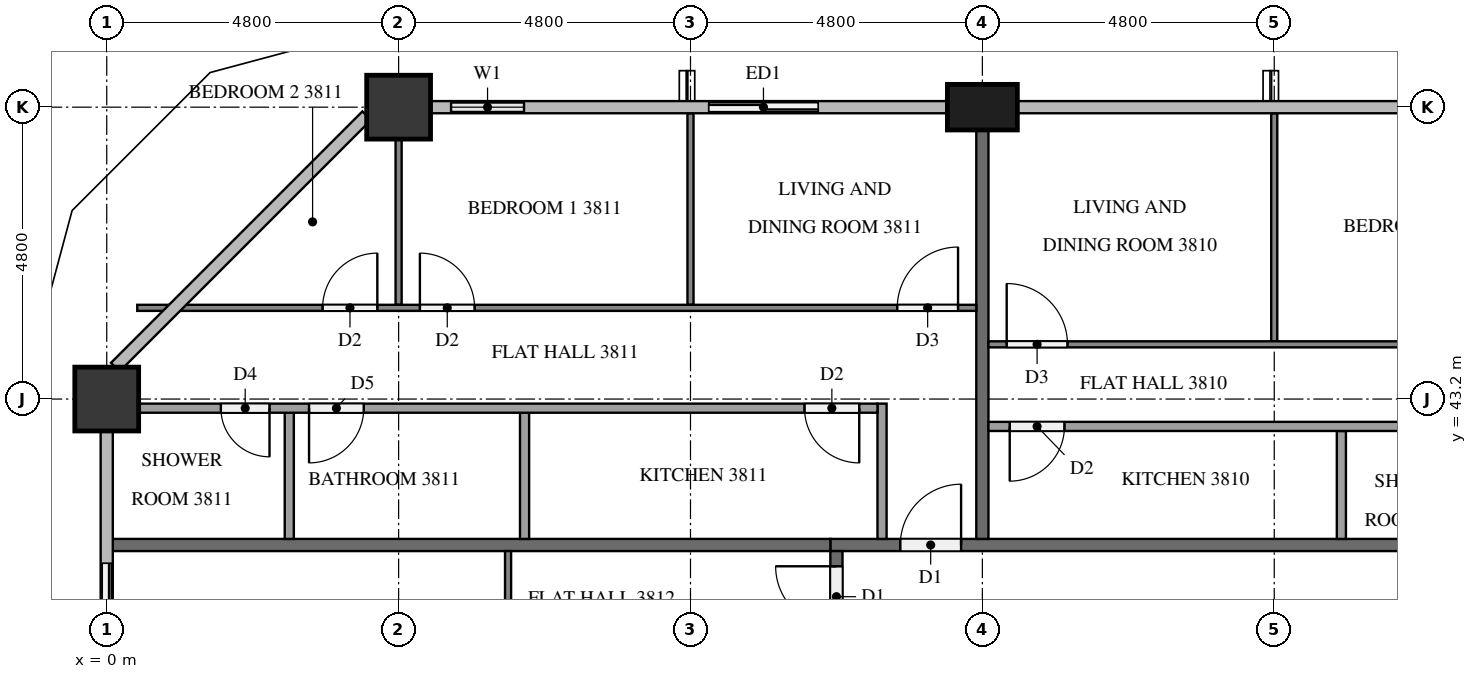
"""IFC4 building model, lengths in metres.
Left out: names, types, materials, properties, quantities, classifications, styles, units other than length and angle.
Written with IfcOpenShell. Run it as: python <this file> out.ifc"""

import sys

from ifc_helpers import new_model, si_unit, direction, frame, frame_2d, origin, origin_2d, place, context, subcontext, project, spatial, rectangle, extrude, element, fill, save


model = new_model("IFC4")
c1 = context("Model", 3, precision=1e-05, world=origin(), true_north=direction((0.0, 1.0)))
c2 = subcontext(c1, "Body", "Model", "MODEL_VIEW")
j1 = project(units=[si_unit("LENGTHUNIT", "METRE"), si_unit("PLANEANGLEUNIT", "RADIAN")], contexts=[c1])
p1 = place(None, origin())
s1 = spatial("IfcSite", under=j1, at=p1, CompositionType="ELEMENT")
p2 = place(p1, origin())
s2 = spatial("IfcBuilding", under=s1, at=p2, CompositionType="ELEMENT")
p3 = place(p2, frame((0.0, 0.0, 149.0)))
s3 = spatial("IfcBuildingStorey", under=s2, at=p3, CompositionType="ELEMENT", Elevation=149.0)
p4 = place(p3, frame((14.4, 48.0, 0.0), z_axis=(0.0, 0.0, 1.0), x_axis=(1.0, 0.0, 0.0)))
e1 = element("IfcColumn", 1, at=p4, inside=s3, PredefinedType="COLUMN", context=c2, shape_type="SweptSolid", body=[
    extrude(rectangle(XDim=1.15, YDim=0.75, at=origin_2d()), origin(), (0.0, 0.0, 1.0), 3.2),
])
for number, where, z_axis, x_axis in (
    (2, (4.8, 48.0, 0.0), (0.0, 0.0, 1.0), (1.0, 0.0, 0.0)),
    (3, (0.0, 43.2, 0.0), (0.0, 0.0, 1.0), (1.0, 0.0, 0.0)),
):
    element("IfcColumn", number, at=place(p3, frame(where, z_axis=z_axis, x_axis=x_axis)), inside=s3, PredefinedType="COLUMN", context=c2, shape_type="SweptSolid", body=[
        extrude(rectangle(XDim=1.05, YDim=1.05, at=origin_2d()), origin(), (0.0, 0.0, 1.0), 3.2),
    ])
p5 = place(p3, frame((12.0, 48.0, 0.0), z_axis=(0.0, 0.0, 1.0), x_axis=(-1.0, 0.0, 0.0)))
e4 = element("IfcWall", 4, at=p5, inside=s3, PredefinedType="SOLIDWALL", context=c2, shape_type="SweptSolid", body=[
    extrude(rectangle(XDim=2.4, YDim=0.15, at=frame_2d((1.2, 0.0))), origin(), (0.0, 0.0, 1.0), 3.2),
])
p6 = place(p5, frame((0.3, 0.0, 0.0)))
e5 = element("IfcOpeningElement", 5, at=p6, cuts=e4, PredefinedType="OPENING", context=c2, shape_type="SweptSolid", body=[
    extrude(rectangle(XDim=1.8, YDim=2.4, at=frame_2d((0.9, 1.2))), frame((0.0, 0.085, 0.0), z_axis=(0.0, -1.0, 0.0), x_axis=(1.0, 0.0, 0.0)), (0.0, 0.0, 1.0), 0.17),
])
p7 = place(p3, frame((7.2, 48.0, 0.0), z_axis=(0.0, 0.0, 1.0), x_axis=(-1.0, 0.0, 0.0)))
e6 = element("IfcWall", 6, at=p7, inside=s3, PredefinedType="SOLIDWALL", context=c2, shape_type="SweptSolid", body=[
    extrude(rectangle(XDim=1.875, YDim=0.15, at=frame_2d((0.938, 0.0))), origin(), (0.0, 0.0, 1.0), 3.2),
])
p8 = place(p7, frame((0.337, 0.0, 0.9)))
e7 = element("IfcOpeningElement", 7, at=p8, cuts=e6, PredefinedType="OPENING", context=c2, shape_type="SweptSolid", body=[
    extrude(rectangle(XDim=1.2, YDim=1.4, at=frame_2d((0.6, 0.7))), frame((0.0, 0.085, 0.0), z_axis=(0.0, -1.0, 0.0), x_axis=(1.0, 0.0, 0.0)), (0.0, 0.0, 1.0), 0.17),
])
p9 = place(p3, frame((0.0, 40.8, 0.0), z_axis=(0.0, 0.0, 1.0), x_axis=(0.0, -1.0, 0.0)))
e8 = element("IfcWall", 8, at=p9, inside=s3, PredefinedType="SOLIDWALL", context=c2, shape_type="SweptSolid", body=[
    extrude(rectangle(XDim=2.4, YDim=0.15, at=frame_2d((1.2, 0.0))), origin(), (0.0, 0.0, 1.0), 3.2),
])
p10 = place(p9, frame((0.3, 0.0, 0.0)))
e9 = element("IfcOpeningElement", 9, at=p10, cuts=e8, PredefinedType="OPENING", context=c2, shape_type="SweptSolid", body=[
    extrude(rectangle(XDim=1.8, YDim=2.4, at=frame_2d((0.9, 1.2))), frame((0.0, 0.085, 0.0), z_axis=(0.0, -1.0, 0.0), x_axis=(1.0, 0.0, 0.0)), (0.0, 0.0, 1.0), 0.17),
])
p11 = place(p3, frame((11.9, 40.8, 0.0), z_axis=(0.0, 0.0, 1.0), x_axis=(1.0, 0.0, 0.0)))
e10 = element("IfcWall", 10, at=p11, inside=s3, PredefinedType="PARTITIONING", context=c2, shape_type="SweptSolid", body=[
    extrude(rectangle(XDim=38.6, YDim=0.2, at=frame_2d((19.3, 0.0))), origin(), (0.0, 0.0, 1.0), 3.2),
])
p12 = place(p11, frame((31.65, 0.0, 0.0)))
e11 = element("IfcOpeningElement", 11, at=p12, cuts=e10, PredefinedType="OPENING", context=c2, shape_type="SweptSolid", body=[
    extrude(rectangle(XDim=1.0, YDim=2.1, at=frame_2d((0.5, 1.05))), frame((0.0, 0.11, 0.0), z_axis=(0.0, -1.0, 0.0), x_axis=(1.0, 0.0, 0.0)), (0.0, 0.0, 1.0), 0.22),
])
p13 = place(p11, frame((29.95, 0.0, 0.0)))
e12 = element("IfcOpeningElement", 12, at=p13, cuts=e10, PredefinedType="OPENING", context=c2, shape_type="SweptSolid", body=[
    extrude(rectangle(XDim=1.0, YDim=2.1, at=frame_2d((0.5, 1.05))), frame((0.0, 0.11, 0.0), z_axis=(0.0, -1.0, 0.0), x_axis=(1.0, 0.0, 0.0)), (0.0, 0.0, 1.0), 0.22),
])
p14 = place(p11, frame((15.55, 0.0, 0.0)))
e13 = element("IfcOpeningElement", 13, at=p14, cuts=e10, PredefinedType="OPENING", context=c2, shape_type="SweptSolid", body=[
    extrude(rectangle(XDim=1.0, YDim=2.1, at=frame_2d((0.5, 1.05))), frame((0.0, 0.11, 0.0), z_axis=(0.0, -1.0, 0.0), x_axis=(1.0, 0.0, 0.0)), (0.0, 0.0, 1.0), 0.22),
])
p15 = place(p11, frame((1.15, 0.0, 0.0)))
e14 = element("IfcOpeningElement", 14, at=p15, cuts=e10, PredefinedType="OPENING", context=c2, shape_type="SweptSolid", body=[
    extrude(rectangle(XDim=1.0, YDim=2.1, at=frame_2d((0.5, 1.05))), frame((0.0, 0.11, 0.0), z_axis=(0.0, -1.0, 0.0), x_axis=(1.0, 0.0, 0.0)), (0.0, 0.0, 1.0), 0.22),
])
p16 = place(p3, frame((12.0, 12.1, 0.0), z_axis=(0.0, 0.0, 1.0), x_axis=(0.0, 1.0, 0.0)))
e15 = element("IfcWall", 15, at=p16, inside=s3, PredefinedType="PARTITIONING", context=c2, shape_type="SweptSolid", body=[
    extrude(rectangle(XDim=28.6, YDim=0.2, at=frame_2d((14.3, 0.0))), origin(), (0.0, 0.0, 1.0), 3.2),
])
p17 = place(p16, frame((27.35, 0.0, 0.0)))
e16 = element("IfcOpeningElement", 16, at=p17, cuts=e15, PredefinedType="OPENING", context=c2, shape_type="SweptSolid", body=[
    extrude(rectangle(XDim=1.0, YDim=2.1, at=frame_2d((0.5, 1.05))), frame((0.0, 0.11, 0.0), z_axis=(0.0, -1.0, 0.0), x_axis=(1.0, 0.0, 0.0)), (0.0, 0.0, 1.0), 0.22),
])
p18 = place(p16, frame((20.15, 0.0, 0.0)))
e17 = element("IfcOpeningElement", 17, at=p18, cuts=e15, PredefinedType="OPENING", context=c2, shape_type="SweptSolid", body=[
    extrude(rectangle(XDim=1.0, YDim=2.1, at=frame_2d((0.5, 1.05))), frame((0.0, 0.11, 0.0), z_axis=(0.0, -1.0, 0.0), x_axis=(1.0, 0.0, 0.0)), (0.0, 0.0, 1.0), 0.22),
])
p19 = place(p16, frame((10.55, 0.0, 0.0)))
e18 = element("IfcOpeningElement", 18, at=p19, cuts=e15, PredefinedType="OPENING", context=c2, shape_type="SweptSolid", body=[
    extrude(rectangle(XDim=1.0, YDim=2.1, at=frame_2d((0.5, 1.05))), frame((0.0, 0.11, 0.0), z_axis=(0.0, -1.0, 0.0), x_axis=(1.0, 0.0, 0.0)), (0.0, 0.0, 1.0), 0.22),
])
p20 = place(p3, frame((14.4, 47.625, 0.0), z_axis=(0.0, 0.0, 1.0), x_axis=(0.0, -1.0, 0.0)))
e19 = element("IfcWall", 19, at=p20, inside=s3, PredefinedType="PARTITIONING", context=c2, shape_type="SweptSolid", body=[
    extrude(rectangle(XDim=6.725, YDim=0.2, at=frame_2d((3.363, 0.0))), origin(), (0.0, 0.0, 1.0), 3.2),
])
p21 = place(p3, frame((0.1, 40.8, 0.0), z_axis=(0.0, 0.0, 1.0), x_axis=(1.0, 0.0, 0.0)))
e20 = element("IfcWall", 20, at=p21, inside=s3, PredefinedType="PARTITIONING", context=c2, shape_type="SweptSolid", body=[
    extrude(rectangle(XDim=11.8, YDim=0.2, at=frame_2d((5.9, 0.0))), origin(), (0.0, 0.0, 1.0), 3.2),
])
p22 = place(p3, frame((19.2, 44.15, 0.0), z_axis=(0.0, 0.0, 1.0), x_axis=(0.0, 1.0, 0.0)))
e21 = element("IfcWall", 21, at=p22, inside=s3, PredefinedType="PARTITIONING", context=c2, shape_type="SweptSolid", body=[
    extrude(rectangle(XDim=3.75, YDim=0.1, at=frame_2d((1.875, 0.0))), origin(), (0.0, 0.0, 1.0), 3.2),
])
p23 = place(p3, frame((14.5, 44.1, 0.0), z_axis=(0.0, 0.0, 1.0), x_axis=(1.0, 0.0, 0.0)))
e22 = element("IfcWall", 22, at=p23, inside=s3, PredefinedType="PARTITIONING", context=c2, shape_type="SweptSolid", body=[
    extrude(rectangle(XDim=14.2, YDim=0.1, at=frame_2d((7.1, 0.0))), origin(), (0.0, 0.0, 1.0), 3.2),
])
p24 = place(p23, frame((9.85, 0.0, 0.0)))
e23 = element("IfcOpeningElement", 23, at=p24, cuts=e22, PredefinedType="OPENING", context=c2, shape_type="SweptSolid", body=[
    extrude(rectangle(XDim=0.9, YDim=2.1, at=frame_2d((0.45, 1.05))), frame((0.0, 0.06, 0.0), z_axis=(0.0, -1.0, 0.0), x_axis=(1.0, 0.0, 0.0)), (0.0, 0.0, 1.0), 0.12),
])
p25 = place(p23, frame((8.25, 0.0, 0.0)))
e24 = element("IfcOpeningElement", 24, at=p25, cuts=e22, PredefinedType="OPENING", context=c2, shape_type="SweptSolid", body=[
    extrude(rectangle(XDim=0.9, YDim=2.1, at=frame_2d((0.45, 1.05))), frame((0.0, 0.06, 0.0), z_axis=(0.0, -1.0, 0.0), x_axis=(1.0, 0.0, 0.0)), (0.0, 0.0, 1.0), 0.12),
])
p26 = place(p23, frame((0.3, 0.0, 0.0)))
e25 = element("IfcOpeningElement", 25, at=p26, cuts=e22, PredefinedType="OPENING", context=c2, shape_type="SweptSolid", body=[
    extrude(rectangle(XDim=1.0, YDim=2.1, at=frame_2d((0.5, 1.05))), frame((0.0, 0.06, 0.0), z_axis=(0.0, -1.0, 0.0), x_axis=(1.0, 0.0, 0.0)), (0.0, 0.0, 1.0), 0.12),
])
p27 = place(p3, frame((20.304, 40.9, 0.0), z_axis=(0.0, 0.0, 1.0), x_axis=(0.0, 1.0, 0.0)))
e26 = element("IfcWall", 26, at=p27, inside=s3, PredefinedType="PARTITIONING", context=c2, shape_type="SweptSolid", body=[
    extrude(rectangle(XDim=1.775, YDim=0.15, at=frame_2d((0.888, 0.0))), origin(), (0.0, 0.0, 1.0), 3.2),
])
p28 = place(p3, frame((27.075, 42.75, 0.0), z_axis=(0.0, 0.0, 1.0), x_axis=(-1.0, 0.0, 0.0)))
e27 = element("IfcWall", 27, at=p28, inside=s3, PredefinedType="PARTITIONING", context=c2, shape_type="SweptSolid", body=[
    extrude(rectangle(XDim=12.575, YDim=0.15, at=frame_2d((6.288, 0.0))), origin(), (0.0, 0.0, 1.0), 3.2),
])
p29 = place(p28, frame((2.644, 0.0, 0.0)))
e28 = element("IfcOpeningElement", 28, at=p29, cuts=e27, PredefinedType="OPENING", context=c2, shape_type="SweptSolid", body=[
    extrude(rectangle(XDim=0.9, YDim=2.1, at=frame_2d((0.45, 1.05))), frame((0.0, 0.085, 0.0), z_axis=(0.0, -1.0, 0.0), x_axis=(1.0, 0.0, 0.0)), (0.0, 0.0, 1.0), 0.17),
])
p30 = place(p28, frame((4.194, 0.0, 0.0)))
e29 = element("IfcOpeningElement", 29, at=p30, cuts=e27, PredefinedType="OPENING", context=c2, shape_type="SweptSolid", body=[
    extrude(rectangle(XDim=0.8, YDim=2.1, at=frame_2d((0.4, 1.05))), frame((0.0, 0.085, 0.0), z_axis=(0.0, -1.0, 0.0), x_axis=(1.0, 0.0, 0.0)), (0.0, 0.0, 1.0), 0.17),
])
p31 = place(p28, frame((11.325, 0.0, 0.0)))
e30 = element("IfcOpeningElement", 30, at=p31, cuts=e27, PredefinedType="OPENING", context=c2, shape_type="SweptSolid", body=[
    extrude(rectangle(XDim=0.9, YDim=2.1, at=frame_2d((0.45, 1.05))), frame((0.0, 0.085, 0.0), z_axis=(0.0, -1.0, 0.0), x_axis=(1.0, 0.0, 0.0)), (0.0, 0.0, 1.0), 0.17),
])
p32 = place(p3, frame((9.6, 44.75, 0.0), z_axis=(0.0, 0.0, 1.0), x_axis=(0.0, 1.0, 0.0)))
e31 = element("IfcWall", 31, at=p32, inside=s3, PredefinedType="PARTITIONING", context=c2, shape_type="SweptSolid", body=[
    extrude(rectangle(XDim=3.15, YDim=0.1, at=frame_2d((1.575, 0.0))), origin(), (0.0, 0.0, 1.0), 3.2),
])
p33 = place(p3, frame((4.8, 44.75, 0.0), z_axis=(0.0, 0.0, 1.0), x_axis=(0.0, 1.0, 0.0)))
e32 = element("IfcWall", 32, at=p33, inside=s3, PredefinedType="PARTITIONING", context=c2, shape_type="SweptSolid", body=[
    extrude(rectangle(XDim=2.725, YDim=0.1, at=frame_2d((1.363, 0.0))), origin(), (0.0, 0.0, 1.0), 3.2),
])
p34 = place(p3, frame((0.502, 44.7, 0.0), z_axis=(0.0, 0.0, 1.0), x_axis=(1.0, 0.0, 0.0)))
e33 = element("IfcWall", 33, at=p34, inside=s3, PredefinedType="PARTITIONING", context=c2, shape_type="SweptSolid", body=[
    extrude(rectangle(XDim=13.798, YDim=0.1, at=frame_2d((6.899, 0.0))), origin(), (0.0, 0.0, 1.0), 3.2),
])
p35 = place(p34, frame((12.498, 0.0, 0.0)))
e34 = element("IfcOpeningElement", 34, at=p35, cuts=e33, PredefinedType="OPENING", context=c2, shape_type="SweptSolid", body=[
    extrude(rectangle(XDim=1.0, YDim=2.1, at=frame_2d((0.5, 1.05))), frame((0.0, 0.06, 0.0), z_axis=(0.0, -1.0, 0.0), x_axis=(1.0, 0.0, 0.0)), (0.0, 0.0, 1.0), 0.12),
])
p36 = place(p34, frame((4.648, 0.0, 0.0)))
e35 = element("IfcOpeningElement", 35, at=p36, cuts=e33, PredefinedType="OPENING", context=c2, shape_type="SweptSolid", body=[
    extrude(rectangle(XDim=0.9, YDim=2.1, at=frame_2d((0.45, 1.05))), frame((0.0, 0.06, 0.0), z_axis=(0.0, -1.0, 0.0), x_axis=(1.0, 0.0, 0.0)), (0.0, 0.0, 1.0), 0.12),
])
p37 = place(p34, frame((3.048, 0.0, 0.0)))
e36 = element("IfcOpeningElement", 36, at=p37, cuts=e33, PredefinedType="OPENING", context=c2, shape_type="SweptSolid", body=[
    extrude(rectangle(XDim=0.9, YDim=2.1, at=frame_2d((0.45, 1.05))), frame((0.0, 0.06, 0.0), z_axis=(0.0, -1.0, 0.0), x_axis=(1.0, 0.0, 0.0)), (0.0, 0.0, 1.0), 0.12),
])
for number, where, z_axis, x_axis in (
    (37, (6.871, 40.9, 0.0), (0.0, 0.0, 1.0), (0.0, 1.0, 0.0)),
    (38, (3.002, 40.9, 0.0), (0.0, 0.0, 1.0), (0.0, 1.0, 0.0)),
):
    element("IfcWall", number, at=place(p3, frame(where, z_axis=z_axis, x_axis=x_axis)), inside=s3, PredefinedType="PARTITIONING", context=c2, shape_type="SweptSolid", body=[
        extrude(rectangle(XDim=2.075, YDim=0.15, at=frame_2d((1.038, 0.0))), origin(), (0.0, 0.0, 1.0), 3.2),
    ])
p38 = place(p3, frame((12.75, 40.9, 0.0), z_axis=(0.0, 0.0, 1.0), x_axis=(0.0, 1.0, 0.0)))
e39 = element("IfcWall", 39, at=p38, inside=s3, PredefinedType="PARTITIONING", context=c2, shape_type="SweptSolid", body=[
    extrude(rectangle(XDim=2.225, YDim=0.15, at=frame_2d((1.113, 0.0))), origin(), (0.0, 0.0, 1.0), 3.2),
])
p39 = place(p3, frame((12.675, 43.05, 0.0), z_axis=(0.0, 0.0, 1.0), x_axis=(-1.0, 0.0, 0.0)))
e40 = element("IfcWall", 40, at=p39, inside=s3, PredefinedType="PARTITIONING", context=c2, shape_type="SweptSolid", body=[
    extrude(rectangle(XDim=12.15, YDim=0.15, at=frame_2d((6.075, 0.0))), origin(), (0.0, 0.0, 1.0), 3.2),
])
p40 = place(p39, frame((0.3, 0.0, 0.0)))
e41 = element("IfcOpeningElement", 41, at=p40, cuts=e40, PredefinedType="OPENING", context=c2, shape_type="SweptSolid", body=[
    extrude(rectangle(XDim=0.9, YDim=2.1, at=frame_2d((0.45, 1.05))), frame((0.0, 0.085, 0.0), z_axis=(0.0, -1.0, 0.0), x_axis=(1.0, 0.0, 0.0)), (0.0, 0.0, 1.0), 0.17),
])
p41 = place(p39, frame((8.448, 0.0, 0.0)))
e42 = element("IfcOpeningElement", 42, at=p41, cuts=e40, PredefinedType="OPENING", context=c2, shape_type="SweptSolid", body=[
    extrude(rectangle(XDim=0.9, YDim=2.1, at=frame_2d((0.45, 1.05))), frame((0.0, 0.085, 0.0), z_axis=(0.0, -1.0, 0.0), x_axis=(1.0, 0.0, 0.0)), (0.0, 0.0, 1.0), 0.17),
])
p42 = place(p39, frame((9.998, 0.0, 0.0)))
e43 = element("IfcOpeningElement", 43, at=p42, cuts=e40, PredefinedType="OPENING", context=c2, shape_type="SweptSolid", body=[
    extrude(rectangle(XDim=0.8, YDim=2.1, at=frame_2d((0.4, 1.05))), frame((0.0, 0.085, 0.0), z_axis=(0.0, -1.0, 0.0), x_axis=(1.0, 0.0, 0.0)), (0.0, 0.0, 1.0), 0.17),
])
p43 = place(p3, frame((6.6, 33.7, 0.0), z_axis=(0.0, 0.0, 1.0), x_axis=(0.0, 1.0, 0.0)))
e44 = element("IfcWall", 44, at=p43, inside=s3, PredefinedType="PARTITIONING", context=c2, shape_type="SweptSolid", body=[
    extrude(rectangle(XDim=7.0, YDim=0.1, at=frame_2d((3.5, 0.0))), origin(), (0.0, 0.0, 1.0), 3.2),
])
p44 = place(p43, frame((0.3, 0.0, 0.0)))
e45 = element("IfcOpeningElement", 45, at=p44, cuts=e44, PredefinedType="OPENING", context=c2, shape_type="SweptSolid", body=[
    extrude(rectangle(XDim=1.0, YDim=2.1, at=frame_2d((0.5, 1.05))), frame((0.0, 0.06, 0.0), z_axis=(0.0, -1.0, 0.0), x_axis=(1.0, 0.0, 0.0)), (0.0, 0.0, 1.0), 0.12),
])
p45 = place(p6, origin())
e46 = element("IfcDoor", 46, at=p45, inside=s3, OperationType="SLIDING_TO_RIGHT", PredefinedType="DOOR", context=c2, shape_type="SweptSolid", body=[
    extrude(rectangle(XDim=1.8, YDim=2.4, at=frame_2d((0.9, 1.2))), frame((0.0, 0.025, 0.0), z_axis=(0.0, -1.0, 0.0), x_axis=(1.0, 0.0, 0.0)), (0.0, 0.0, 1.0), 0.05),
])
fill(e5, e46)
p46 = place(p8, origin())
e47 = element("IfcWindow", 47, at=p46, inside=s3, PartitioningType="SINGLE_PANEL", PredefinedType="WINDOW", context=c2, shape_type="SweptSolid", body=[
    extrude(rectangle(XDim=1.2, YDim=1.4, at=frame_2d((0.6, 0.7))), frame((0.0, 0.03, 0.0), z_axis=(0.0, -1.0, 0.0), x_axis=(1.0, 0.0, 0.0)), (0.0, 0.0, 1.0), 0.06),
])
fill(e7, e47)
p47 = place(p10, origin())
e48 = element("IfcDoor", 48, at=p47, inside=s3, OperationType="SLIDING_TO_LEFT", PredefinedType="DOOR", context=c2, shape_type="SweptSolid", body=[
    extrude(rectangle(XDim=1.8, YDim=2.4, at=frame_2d((0.9, 1.2))), frame((0.0, 0.025, 0.0), z_axis=(0.0, -1.0, 0.0), x_axis=(1.0, 0.0, 0.0)), (0.0, 0.0, 1.0), 0.05),
])
fill(e9, e48)
p48 = place(p15, origin())
e49 = element("IfcDoor", 49, at=p48, inside=s3, OperationType="SINGLE_SWING_RIGHT", PredefinedType="DOOR", context=c2, shape_type="SweptSolid", body=[
    extrude(rectangle(XDim=1.0, YDim=2.1, at=frame_2d((0.5, 1.05))), frame((0.0, 0.025, 0.0), z_axis=(0.0, -1.0, 0.0), x_axis=(1.0, 0.0, 0.0)), (0.0, 0.0, 1.0), 0.05),
])
fill(e14, e49)
p49 = place(p17, origin())
e50 = element("IfcDoor", 50, at=p49, inside=s3, OperationType="SINGLE_SWING_RIGHT", PredefinedType="DOOR", context=c2, shape_type="SweptSolid", body=[
    extrude(rectangle(XDim=1.0, YDim=2.1, at=frame_2d((0.5, 1.05))), frame((0.0, 0.025, 0.0), z_axis=(0.0, -1.0, 0.0), x_axis=(1.0, 0.0, 0.0)), (0.0, 0.0, 1.0), 0.05),
])
fill(e16, e50)
p50 = place(p26, origin())
e51 = element("IfcDoor", 51, at=p50, inside=s3, OperationType="SINGLE_SWING_LEFT", PredefinedType="DOOR", context=c2, shape_type="SweptSolid", body=[
    extrude(rectangle(XDim=1.0, YDim=2.1, at=frame_2d((0.5, 1.05))), frame((0.0, 0.025, 0.0), z_axis=(0.0, -1.0, 0.0), x_axis=(1.0, 0.0, 0.0)), (0.0, 0.0, 1.0), 0.05),
])
fill(e25, e51)
p51 = place(p31, origin())
e52 = element("IfcDoor", 52, at=p51, inside=s3, OperationType="SINGLE_SWING_RIGHT", PredefinedType="DOOR", context=c2, shape_type="SweptSolid", body=[
    extrude(rectangle(XDim=0.9, YDim=2.1, at=frame_2d((0.45, 1.05))), frame((0.0, 0.025, 0.0), z_axis=(0.0, -1.0, 0.0), x_axis=(1.0, 0.0, 0.0)), (0.0, 0.0, 1.0), 0.05),
])
fill(e30, e52)
p52 = place(p35, origin())
e53 = element("IfcDoor", 53, at=p52, inside=s3, OperationType="SINGLE_SWING_RIGHT", PredefinedType="DOOR", context=c2, shape_type="SweptSolid", body=[
    extrude(rectangle(XDim=1.0, YDim=2.1, at=frame_2d((0.5, 1.05))), frame((0.0, 0.025, 0.0), z_axis=(0.0, -1.0, 0.0), x_axis=(1.0, 0.0, 0.0)), (0.0, 0.0, 1.0), 0.05),
])
fill(e34, e53)
p53 = place(p36, origin())
e54 = element("IfcDoor", 54, at=p53, inside=s3, OperationType="SINGLE_SWING_LEFT", PredefinedType="DOOR", context=c2, shape_type="SweptSolid", body=[
    extrude(rectangle(XDim=0.9, YDim=2.1, at=frame_2d((0.45, 1.05))), frame((0.0, 0.025, 0.0), z_axis=(0.0, -1.0, 0.0), x_axis=(1.0, 0.0, 0.0)), (0.0, 0.0, 1.0), 0.05),
])
fill(e35, e54)
p54 = place(p37, origin())
e55 = element("IfcDoor", 55, at=p54, inside=s3, OperationType="SINGLE_SWING_RIGHT", PredefinedType="DOOR", context=c2, shape_type="SweptSolid", body=[
    extrude(rectangle(XDim=0.9, YDim=2.1, at=frame_2d((0.45, 1.05))), frame((0.0, 0.025, 0.0), z_axis=(0.0, -1.0, 0.0), x_axis=(1.0, 0.0, 0.0)), (0.0, 0.0, 1.0), 0.05),
])
fill(e36, e55)
p55 = place(p40, origin())
e56 = element("IfcDoor", 56, at=p55, inside=s3, OperationType="SINGLE_SWING_LEFT", PredefinedType="DOOR", context=c2, shape_type="SweptSolid", body=[
    extrude(rectangle(XDim=0.9, YDim=2.1, at=frame_2d((0.45, 1.05))), frame((0.0, 0.025, 0.0), z_axis=(0.0, -1.0, 0.0), x_axis=(1.0, 0.0, 0.0)), (0.0, 0.0, 1.0), 0.05),
])
fill(e41, e56)
p56 = place(p41, origin())
e57 = element("IfcDoor", 57, at=p56, inside=s3, OperationType="SINGLE_SWING_RIGHT", PredefinedType="DOOR", context=c2, shape_type="SweptSolid", body=[
    extrude(rectangle(XDim=0.9, YDim=2.1, at=frame_2d((0.45, 1.05))), frame((0.0, 0.025, 0.0), z_axis=(0.0, -1.0, 0.0), x_axis=(1.0, 0.0, 0.0)), (0.0, 0.0, 1.0), 0.05),
])
fill(e42, e57)
p57 = place(p42, origin())
e58 = element("IfcDoor", 58, at=p57, inside=s3, OperationType="SINGLE_SWING_LEFT", PredefinedType="DOOR", context=c2, shape_type="SweptSolid", body=[
    extrude(rectangle(XDim=0.8, YDim=2.1, at=frame_2d((0.4, 1.05))), frame((0.0, 0.025, 0.0), z_axis=(0.0, -1.0, 0.0), x_axis=(1.0, 0.0, 0.0)), (0.0, 0.0, 1.0), 0.05),
])
fill(e43, e58)
save(model, sys.argv[1])
